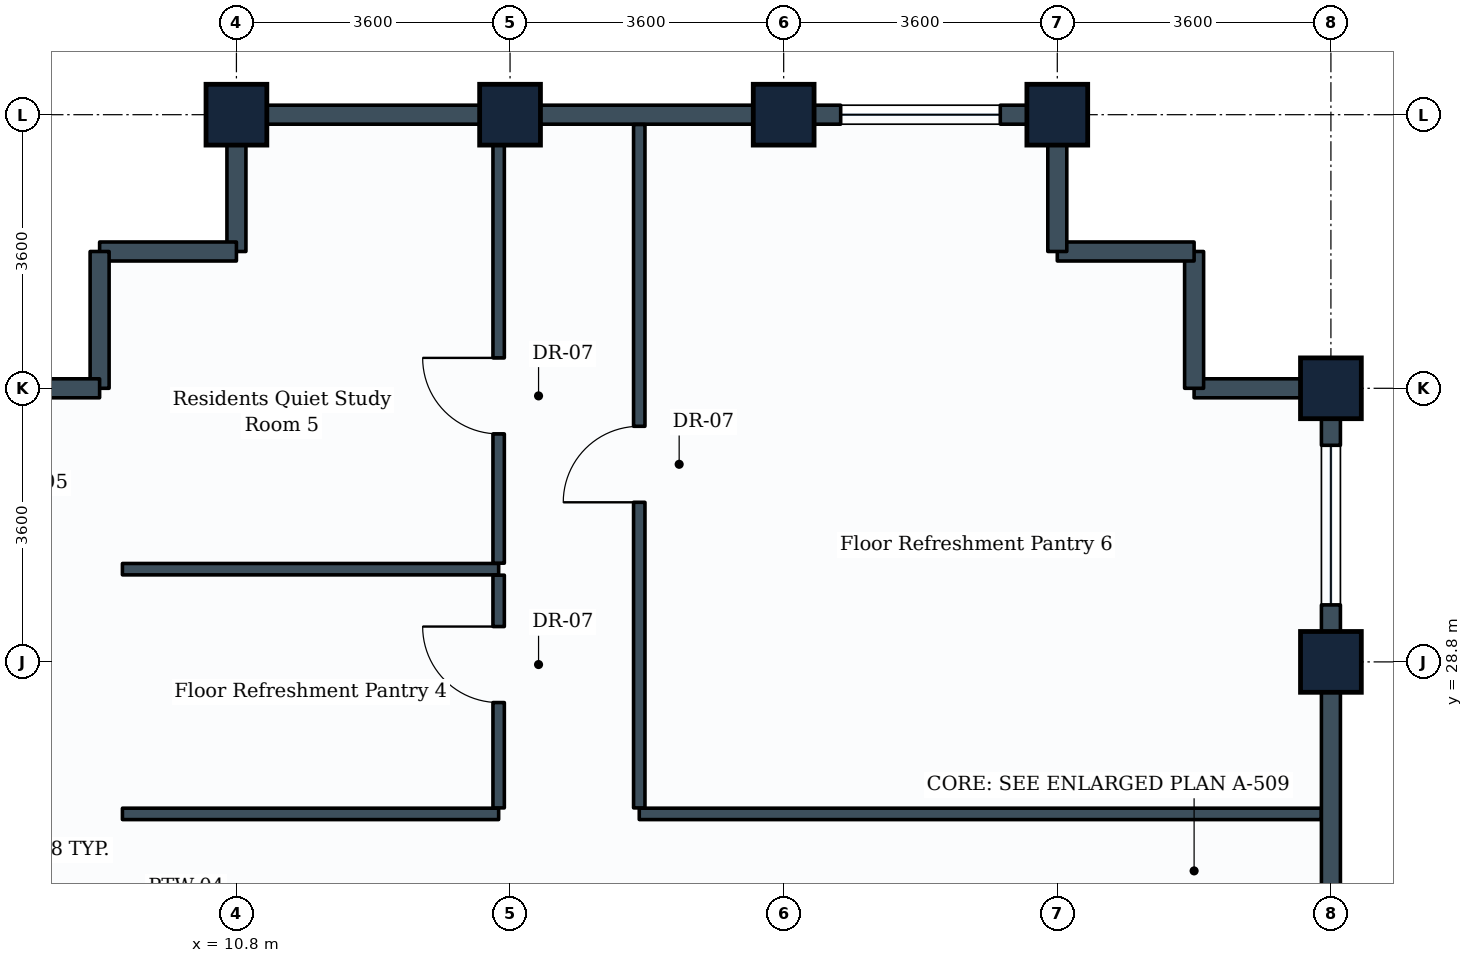
"""IFC4 building model, lengths in metres.
Left out: names, types, materials, properties, quantities, classifications, styles, units other than length and angle.
Written with IfcOpenShell. Run it as: python <this file> out.ifc"""

import sys

from ifc_helpers import new_model, si_unit, direction, frame, frame_2d, origin, origin_2d, place, context, subcontext, project, spatial, rectangle, extrude, element, fill, save


model = new_model("IFC4")
c1 = context("Model", 3, precision=1e-05, world=origin(), true_north=direction((0.0, 1.0)))
c2 = subcontext(c1, "Body", "Model", "MODEL_VIEW")
j1 = project(units=[si_unit("LENGTHUNIT", "METRE"), si_unit("PLANEANGLEUNIT", "RADIAN")], contexts=[c1])
p1 = place(None, origin())
s1 = spatial("IfcSite", under=j1, at=p1, CompositionType="ELEMENT")
p2 = place(p1, origin())
s2 = spatial("IfcBuilding", under=s1, at=p2, CompositionType="ELEMENT")
p3 = place(p2, frame((0.0, 0.0, 263.0)))
s3 = spatial("IfcBuildingStorey", under=s2, at=p3, CompositionType="ELEMENT", Elevation=263.0)
for number, where, z_axis, x_axis in (
    (1, (10.8, 36.0, 0.0), (0.0, 0.0, 1.0), (1.0, 0.0, 0.0)),
    (2, (14.4, 36.0, 0.0), (0.0, 0.0, 1.0), (1.0, 0.0, 0.0)),
    (3, (18.0, 36.0, 0.0), (0.0, 0.0, 1.0), (1.0, 0.0, 0.0)),
    (4, (21.6, 36.0, 0.0), (0.0, 0.0, 1.0), (1.0, 0.0, 0.0)),
    (5, (25.2, 28.8, 0.0), (0.0, 0.0, 1.0), (0.0, 1.0, 0.0)),
    (6, (25.2, 32.4, 0.0), (0.0, 0.0, 1.0), (0.0, 1.0, 0.0)),
):
    element("IfcColumn", number, at=place(p3, frame(where, z_axis=z_axis, x_axis=x_axis)), inside=s3, PredefinedType="COLUMN", context=c2, shape_type="SweptSolid", body=[
        extrude(rectangle(XDim=0.8, YDim=0.8, at=origin_2d()), origin(), (0.0, 0.0, 1.0), 3.6),
    ])
p4 = place(p3, frame((25.2, 28.8, 0.0), z_axis=(0.0, 0.0, 1.0), x_axis=(0.0, -1.0, 0.0)))
e7 = element("IfcWall", 7, at=p4, inside=s3, PredefinedType="STANDARD", context=c2, shape_type="SweptSolid", body=[
    extrude(rectangle(XDim=3.6, YDim=0.25, at=frame_2d((1.8, 0.0))), origin(), (0.0, 0.0, 1.0), 2.83),
])
p5 = place(p3, frame((25.2, 32.4, 0.0), z_axis=(0.0, 0.0, 1.0), x_axis=(0.0, -1.0, 0.0)))
e8 = element("IfcWall", 8, at=p5, inside=s3, PredefinedType="STANDARD", context=c2, shape_type="SweptSolid", body=[
    extrude(rectangle(XDim=3.6, YDim=0.25, at=frame_2d((1.8, 0.0))), origin(), (0.0, 0.0, 1.0), 2.83),
])
p6 = place(p5, frame((0.75, 0.0, 0.85)))
e9 = element("IfcOpeningElement", 9, at=p6, cuts=e8, PredefinedType="OPENING", context=c2, shape_type="SweptSolid", body=[
    extrude(rectangle(XDim=2.1, YDim=1.35, at=frame_2d((1.05, 0.675))), frame((0.0, 0.135, 0.0), z_axis=(0.0, -1.0, 0.0), x_axis=(1.0, 0.0, 0.0)), (0.0, 0.0, 1.0), 0.27),
])
p7 = place(p3, frame((23.4, 32.4, 0.0), z_axis=(0.0, 0.0, 1.0), x_axis=(1.0, 0.0, 0.0)))
e10 = element("IfcWall", 10, at=p7, inside=s3, PredefinedType="STANDARD", context=c2, shape_type="SweptSolid", body=[
    extrude(rectangle(XDim=1.8, YDim=0.25, at=frame_2d((0.9, 0.0))), origin(), (0.0, 0.0, 1.0), 2.83),
])
p8 = place(p3, frame((23.4, 32.4, 0.0), z_axis=(0.0, 0.0, 1.0), x_axis=(0.0, 1.0, 0.0)))
e11 = element("IfcWall", 11, at=p8, inside=s3, PredefinedType="STANDARD", context=c2, shape_type="SweptSolid", body=[
    extrude(rectangle(XDim=1.8, YDim=0.25, at=frame_2d((0.9, 0.0))), origin(), (0.0, 0.0, 1.0), 3.335),
])
p9 = place(p3, frame((21.6, 34.2, 0.0), z_axis=(0.0, 0.0, 1.0), x_axis=(1.0, 0.0, 0.0)))
e12 = element("IfcWall", 12, at=p9, inside=s3, PredefinedType="STANDARD", context=c2, shape_type="SweptSolid", body=[
    extrude(rectangle(XDim=1.8, YDim=0.25, at=frame_2d((0.9, 0.0))), origin(), (0.0, 0.0, 1.0), 3.335),
])
p10 = place(p3, frame((21.6, 34.2, 0.0), z_axis=(0.0, 0.0, 1.0), x_axis=(0.0, 1.0, 0.0)))
e13 = element("IfcWall", 13, at=p10, inside=s3, PredefinedType="STANDARD", context=c2, shape_type="SweptSolid", body=[
    extrude(rectangle(XDim=1.8, YDim=0.25, at=frame_2d((0.9, 0.0))), origin(), (0.0, 0.0, 1.0), 2.83),
])
p11 = place(p3, frame((18.0, 36.0, 0.0), z_axis=(0.0, 0.0, 1.0), x_axis=(1.0, 0.0, 0.0)))
e14 = element("IfcWall", 14, at=p11, inside=s3, PredefinedType="STANDARD", context=c2, shape_type="SweptSolid", body=[
    extrude(rectangle(XDim=3.6, YDim=0.25, at=frame_2d((1.8, 0.0))), origin(), (0.0, 0.0, 1.0), 2.83),
])
p12 = place(p11, frame((0.75, 0.0, 0.85)))
e15 = element("IfcOpeningElement", 15, at=p12, cuts=e14, PredefinedType="OPENING", context=c2, shape_type="SweptSolid", body=[
    extrude(rectangle(XDim=2.1, YDim=1.35, at=frame_2d((1.05, 0.675))), frame((0.0, 0.135, 0.0), z_axis=(0.0, -1.0, 0.0), x_axis=(1.0, 0.0, 0.0)), (0.0, 0.0, 1.0), 0.27),
])
p13 = place(p3, frame((14.4, 36.0, 0.0), z_axis=(0.0, 0.0, 1.0), x_axis=(1.0, 0.0, 0.0)))
e16 = element("IfcWall", 16, at=p13, inside=s3, PredefinedType="STANDARD", context=c2, shape_type="SweptSolid", body=[
    extrude(rectangle(XDim=3.6, YDim=0.25, at=frame_2d((1.8, 0.0))), origin(), (0.0, 0.0, 1.0), 2.83),
])
p14 = place(p3, frame((10.8, 36.0, 0.0), z_axis=(0.0, 0.0, 1.0), x_axis=(1.0, 0.0, 0.0)))
e17 = element("IfcWall", 17, at=p14, inside=s3, PredefinedType="STANDARD", context=c2, shape_type="SweptSolid", body=[
    extrude(rectangle(XDim=3.6, YDim=0.25, at=frame_2d((1.8, 0.0))), origin(), (0.0, 0.0, 1.0), 2.83),
])
p15 = place(p3, frame((10.8, 34.2, 0.0), z_axis=(0.0, 0.0, 1.0), x_axis=(0.0, 1.0, 0.0)))
e18 = element("IfcWall", 18, at=p15, inside=s3, PredefinedType="STANDARD", context=c2, shape_type="SweptSolid", body=[
    extrude(rectangle(XDim=1.8, YDim=0.25, at=frame_2d((0.9, 0.0))), origin(), (0.0, 0.0, 1.0), 2.83),
])
for number, where, z_axis, x_axis in (
    (19, (9.0, 34.2, 0.0), (0.0, 0.0, 1.0), (1.0, 0.0, 0.0)),
    (20, (9.0, 32.4, 0.0), (0.0, 0.0, 1.0), (0.0, 1.0, 0.0)),
):
    element("IfcWall", number, at=place(p3, frame(where, z_axis=z_axis, x_axis=x_axis)), inside=s3, PredefinedType="STANDARD", context=c2, shape_type="SweptSolid", body=[
        extrude(rectangle(XDim=1.8, YDim=0.25, at=frame_2d((0.9, 0.0))), origin(), (0.0, 0.0, 1.0), 3.335),
    ])
p16 = place(p3, frame((7.2, 32.4, 0.0), z_axis=(0.0, 0.0, 1.0), x_axis=(1.0, 0.0, 0.0)))
e21 = element("IfcWall", 21, at=p16, inside=s3, PredefinedType="STANDARD", context=c2, shape_type="SweptSolid", body=[
    extrude(rectangle(XDim=1.8, YDim=0.25, at=frame_2d((0.9, 0.0))), origin(), (0.0, 0.0, 1.0), 2.83),
])
for number, where, z_axis, x_axis in (
    (22, (9.3, 26.8, 0.0), (0.0, 0.0, 1.0), (1.0, 0.0, 0.0)),
    (23, (9.3, 30.02, 0.0), (0.0, 0.0, 1.0), (1.0, 0.0, 0.0)),
):
    element("IfcWall", number, at=place(p3, frame(where, z_axis=z_axis, x_axis=x_axis)), inside=s3, PredefinedType="PARTITIONING", context=c2, shape_type="SweptSolid", body=[
        extrude(rectangle(XDim=4.95, YDim=0.15, at=frame_2d((2.475, 0.0))), origin(), (0.0, 0.0, 1.0), 3.335),
    ])
p17 = place(p3, frame((14.25, 26.879, 0.0), z_axis=(0.0, 0.0, 1.0), x_axis=(0.0, 1.0, 0.0)))
e24 = element("IfcWall", 24, at=p17, inside=s3, PredefinedType="PARTITIONING", context=c2, shape_type="SweptSolid", body=[
    extrude(rectangle(XDim=3.062, YDim=0.15, at=frame_2d((1.531, 0.0))), origin(), (0.0, 0.0, 1.0), 3.03),
])
p18 = place(p17, frame((1.386, 0.0, 0.0)))
e25 = element("IfcOpeningElement", 25, at=p18, cuts=e24, PredefinedType="OPENING", context=c2, shape_type="SweptSolid", body=[
    extrude(rectangle(XDim=1.0, YDim=2.1, at=frame_2d((0.5, 1.05))), frame((0.0, 0.085, 0.0), z_axis=(0.0, -1.0, 0.0), x_axis=(1.0, 0.0, 0.0)), (0.0, 0.0, 1.0), 0.17),
])
p19 = place(p3, frame((14.25, 30.099, 0.0), z_axis=(0.0, 0.0, 1.0), x_axis=(0.0, 1.0, 0.0)))
e26 = element("IfcWall", 26, at=p19, inside=s3, PredefinedType="PARTITIONING", context=c2, shape_type="SweptSolid", body=[
    extrude(rectangle(XDim=5.772, YDim=0.15, at=frame_2d((2.886, 0.0))), origin(), (0.0, 0.0, 1.0), 2.83),
])
p20 = place(p19, frame((1.701, 0.0, 0.0)))
e27 = element("IfcOpeningElement", 27, at=p20, cuts=e26, PredefinedType="OPENING", context=c2, shape_type="SweptSolid", body=[
    extrude(rectangle(XDim=1.0, YDim=2.1, at=frame_2d((0.5, 1.05))), frame((0.0, 0.085, 0.0), z_axis=(0.0, -1.0, 0.0), x_axis=(1.0, 0.0, 0.0)), (0.0, 0.0, 1.0), 0.17),
])
p21 = place(p3, frame((16.1, 26.8, 0.0), z_axis=(0.0, 0.0, 1.0), x_axis=(1.0, 0.0, 0.0)))
e28 = element("IfcWall", 28, at=p21, inside=s3, PredefinedType="PARTITIONING", context=c2, shape_type="SweptSolid", body=[
    extrude(rectangle(XDim=8.971, YDim=0.15, at=frame_2d((4.485, 0.0))), origin(), (0.0, 0.0, 1.0), 2.83),
])
p22 = place(p3, frame((16.1, 26.879, 0.0), z_axis=(0.0, 0.0, 1.0), x_axis=(0.0, 1.0, 0.0)))
e29 = element("IfcWall", 29, at=p22, inside=s3, PredefinedType="PARTITIONING", context=c2, shape_type="SweptSolid", body=[
    extrude(rectangle(XDim=8.992, YDim=0.15, at=frame_2d((4.496, 0.0))), origin(), (0.0, 0.0, 1.0), 2.83),
])
p23 = place(p22, frame((4.021, 0.0, 0.0)))
e30 = element("IfcOpeningElement", 30, at=p23, cuts=e29, PredefinedType="OPENING", context=c2, shape_type="SweptSolid", body=[
    extrude(rectangle(XDim=1.0, YDim=2.1, at=frame_2d((0.5, 1.05))), frame((0.0, 0.085, 0.0), z_axis=(0.0, -1.0, 0.0), x_axis=(1.0, 0.0, 0.0)), (0.0, 0.0, 1.0), 0.17),
])
p24 = place(p6, origin())
e31 = element("IfcWindow", 31, at=p24, inside=s3, PartitioningType="SINGLE_PANEL", PredefinedType="WINDOW", context=c2, shape_type="SweptSolid", body=[
    extrude(rectangle(XDim=2.1, YDim=1.35, at=frame_2d((1.05, 0.675))), frame((0.0, 0.03, 0.0), z_axis=(0.0, -1.0, 0.0), x_axis=(1.0, 0.0, 0.0)), (0.0, 0.0, 1.0), 0.06),
])
fill(e9, e31)
p25 = place(p12, origin())
e32 = element("IfcWindow", 32, at=p25, inside=s3, PartitioningType="SINGLE_PANEL", PredefinedType="WINDOW", context=c2, shape_type="SweptSolid", body=[
    extrude(rectangle(XDim=2.1, YDim=1.35, at=frame_2d((1.05, 0.675))), frame((0.0, 0.03, 0.0), z_axis=(0.0, -1.0, 0.0), x_axis=(1.0, 0.0, 0.0)), (0.0, 0.0, 1.0), 0.06),
])
fill(e15, e32)
p26 = place(p18, origin())
e33 = element("IfcDoor", 33, at=p26, inside=s3, OperationType="SINGLE_SWING_RIGHT", PredefinedType="DOOR", context=c2, shape_type="SweptSolid", body=[
    extrude(rectangle(XDim=1.0, YDim=2.1, at=frame_2d((0.5, 1.05))), frame((0.0, 0.025, 0.0), z_axis=(0.0, -1.0, 0.0), x_axis=(1.0, 0.0, 0.0)), (0.0, 0.0, 1.0), 0.05),
])
fill(e25, e33)
p27 = place(p20, origin())
e34 = element("IfcDoor", 34, at=p27, inside=s3, OperationType="SINGLE_SWING_RIGHT", PredefinedType="DOOR", context=c2, shape_type="SweptSolid", body=[
    extrude(rectangle(XDim=1.0, YDim=2.1, at=frame_2d((0.5, 1.05))), frame((0.0, 0.025, 0.0), z_axis=(0.0, -1.0, 0.0), x_axis=(1.0, 0.0, 0.0)), (0.0, 0.0, 1.0), 0.05),
])
fill(e27, e34)
p28 = place(p23, origin())
e35 = element("IfcDoor", 35, at=p28, inside=s3, OperationType="SINGLE_SWING_LEFT", PredefinedType="DOOR", context=c2, shape_type="SweptSolid", body=[
    extrude(rectangle(XDim=1.0, YDim=2.1, at=frame_2d((0.5, 1.05))), frame((0.0, 0.025, 0.0), z_axis=(0.0, -1.0, 0.0), x_axis=(1.0, 0.0, 0.0)), (0.0, 0.0, 1.0), 0.05),
])
fill(e30, e35)
save(model, sys.argv[1])
